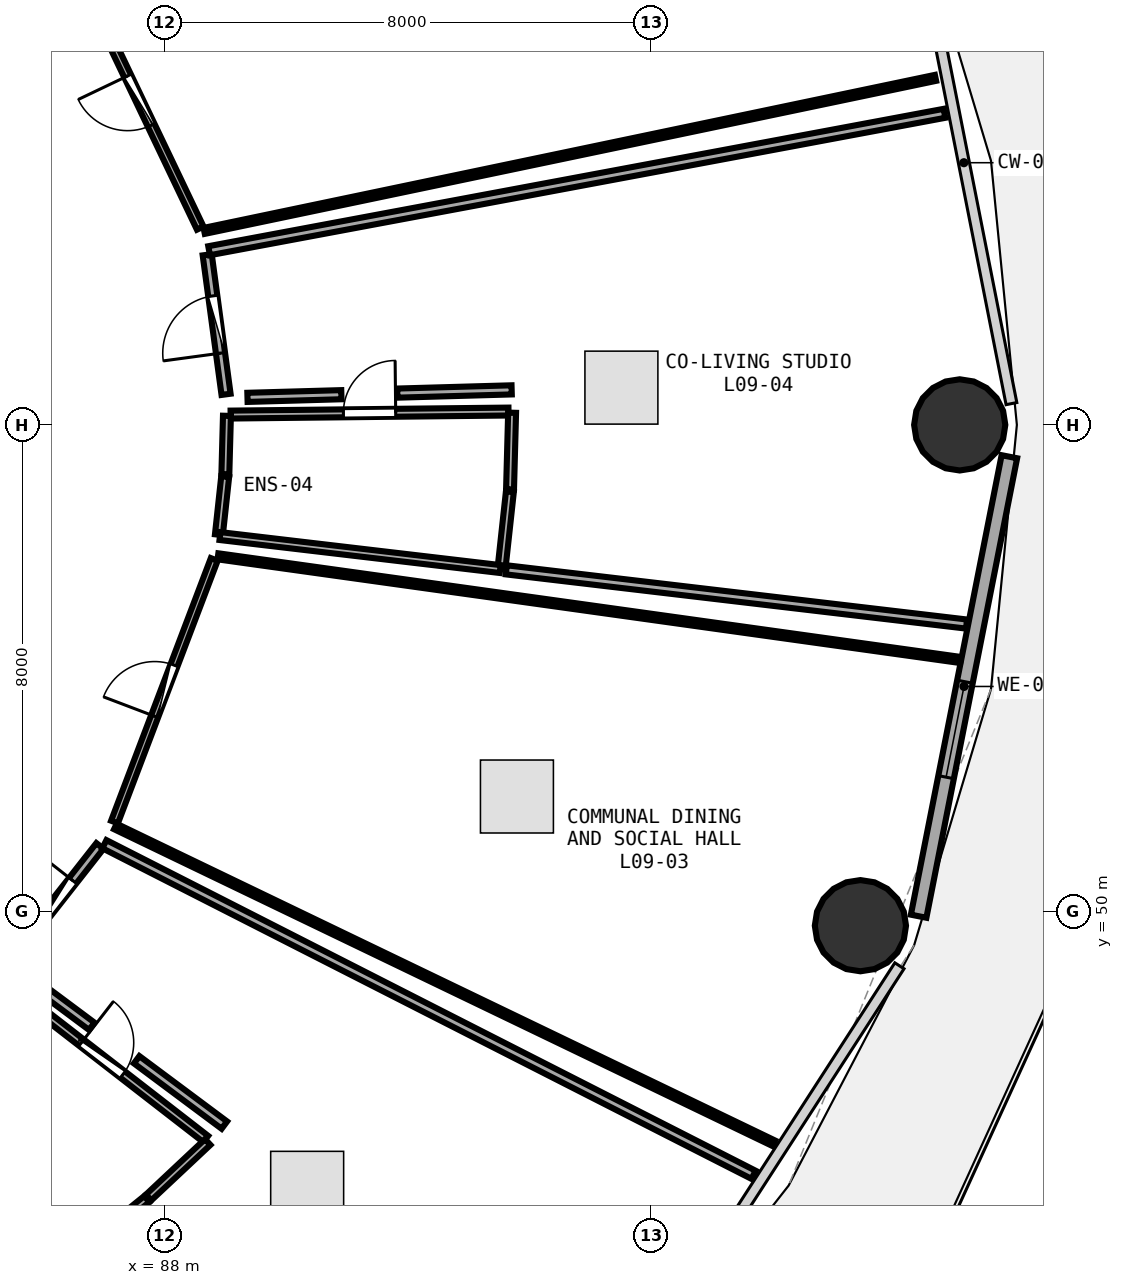
"""IFC4 building model, lengths in metres.
Left out: names, types, materials, properties, quantities, classifications, styles, units other than length and angle.
Written with IfcOpenShell. Run it as: python <this file> out.ifc"""

import sys

from ifc_helpers import new_model, si_unit, direction, frame, frame_2d, origin, origin_2d, place, context, subcontext, project, spatial, rectangle, circle, extrude, element, fill, save


model = new_model("IFC4")
c1 = context("Model", 3, precision=1e-05, world=origin(), true_north=direction((0.0, 1.0)))
c2 = subcontext(c1, "Body", "Model", "MODEL_VIEW")
j1 = project(units=[si_unit("LENGTHUNIT", "METRE"), si_unit("PLANEANGLEUNIT", "RADIAN")], contexts=[c1])
p1 = place(None, origin())
s1 = spatial("IfcSite", under=j1, at=p1, CompositionType="ELEMENT")
p2 = place(p1, origin())
s2 = spatial("IfcBuilding", under=s1, at=p2, CompositionType="ELEMENT")
p3 = place(p2, frame((0.0, 0.0, 37.5)))
s3 = spatial("IfcBuildingStorey", under=s2, at=p3, CompositionType="ELEMENT", Elevation=37.5)
for number, where, z_axis, x_axis in (
    (1, (101.08, 58.0, 0.0), (0.0, 0.0, 1.0), (1.0, 0.0, 0.0)),
    (2, (99.447, 49.764, 0.0), (0.0, 0.0, 1.0), (1.0, 0.0, 0.0)),
):
    element("IfcColumn", number, at=place(p3, frame(where, z_axis=z_axis, x_axis=x_axis)), inside=s3, PredefinedType="COLUMN", context=c2, shape_type="SweptSolid", body=[
        extrude(circle(Radius=0.75, at=origin_2d()), origin(), (0.0, 0.0, 1.0), 3.75),
    ])
p4 = place(p3, frame((100.404, 49.92, 0.0), z_axis=(0.0, 0.0, 1.0), x_axis=(0.193726159581, 0.98105564322, 0.0)))
e3 = element("IfcWall", 3, at=p4, inside=s3, PredefinedType="SOLIDWALL", context=c2, shape_type="SweptSolid", body=[
    extrude(rectangle(XDim=7.703, YDim=0.26, at=frame_2d((3.851, 0.0))), origin(), (0.0, 0.0, 1.0), 3.475),
])
p5 = place(p4, frame((2.331, 0.0, 0.85)))
e4 = element("IfcOpeningElement", 4, at=p5, cuts=e3, PredefinedType="OPENING", context=c2, shape_type="SweptSolid", body=[
    extrude(rectangle(XDim=1.6, YDim=1.45, at=frame_2d((0.8, 0.725))), frame((0.0, 0.14, 0.0), z_axis=(0.0, -1.0, 0.0), x_axis=(1.0, 0.0, 0.0)), (0.0, 0.0, 1.0), 0.28),
])
p6 = place(p3, frame((85.271, 48.898, 0.0), z_axis=(0.0, 0.0, 1.0), x_axis=(0.790415052175, -0.612571665436, 0.0)))
e5 = element("IfcWall", 5, at=p6, inside=s3, PredefinedType="PLUMBINGWALL", context=c2, shape_type="SweptSolid", body=[
    extrude(rectangle(XDim=4.312, YDim=0.13, at=frame_2d((2.156, 0.0))), origin(), (0.0, 0.0, 1.0), 2.875),
])
p7 = place(p6, frame((1.726, 0.0, 0.0)))
e6 = element("IfcOpeningElement", 6, at=p7, cuts=e5, PredefinedType="OPENING", context=c2, shape_type="SweptSolid", body=[
    extrude(rectangle(XDim=0.86, YDim=2.05, at=frame_2d((0.43, 1.025))), frame((0.0, 0.075, 0.0), z_axis=(0.0, -1.0, 0.0), x_axis=(1.0, 0.0, 0.0)), (0.0, 0.0, 1.0), 0.15),
])
p8 = place(p3, frame((85.459, 49.188, 0.0), z_axis=(0.0, 0.0, 1.0), x_axis=(0.617295583742, 0.786731315185, 0.0)))
e7 = element("IfcWall", 7, at=p8, inside=s3, PredefinedType="PARTITIONING", context=c2, shape_type="SweptSolid", body=[
    extrude(rectangle(XDim=2.399, YDim=0.15, at=frame_2d((1.2, 0.0))), origin(), (0.0, 0.0, 1.0), 2.875),
])
p9 = place(p8, frame((0.725, 0.0, 0.0)))
e8 = element("IfcOpeningElement", 8, at=p9, cuts=e7, PredefinedType="OPENING", context=c2, shape_type="SweptSolid", body=[
    extrude(rectangle(XDim=0.95, YDim=2.08, at=frame_2d((0.475, 1.04))), frame((0.0, 0.085, 0.0), z_axis=(0.0, -1.0, 0.0), x_axis=(1.0, 0.0, 0.0)), (0.0, 0.0, 1.0), 0.17),
])
p10 = place(p3, frame((87.179, 51.469, 0.0), z_axis=(0.0, 0.0, 1.0), x_axis=(0.355069987825, 0.934839720886, 0.0)))
e9 = element("IfcWall", 9, at=p10, inside=s3, PredefinedType="PARTITIONING", context=c2, shape_type="SweptSolid", body=[
    extrude(rectangle(XDim=4.62, YDim=0.12, at=frame_2d((2.31, 0.0))), origin(), (0.0, 0.0, 1.0), 3.48),
])
p11 = place(p10, frame((1.86, 0.0, 0.0)))
e10 = element("IfcOpeningElement", 10, at=p11, cuts=e9, PredefinedType="OPENING", context=c2, shape_type="SweptSolid", body=[
    extrude(rectangle(XDim=0.9, YDim=2.08, at=frame_2d((0.45, 1.04))), frame((0.0, 0.07, 0.0), z_axis=(0.0, -1.0, 0.0), x_axis=(1.0, 0.0, 0.0)), (0.0, 0.0, 1.0), 0.14),
])
p12 = place(p3, frame((89.089, 58.17, 0.0), z_axis=(0.0, 0.0, 1.0), x_axis=(0.999941196269, 0.01084453803, 0.0)))
e11 = element("IfcWall", 11, at=p12, inside=s3, PredefinedType="PLUMBINGWALL", context=c2, shape_type="SweptSolid", body=[
    extrude(rectangle(XDim=4.57, YDim=0.13, at=frame_2d((2.285, 0.0))), origin(), (0.0, 0.0, 1.0), 2.875),
])
p13 = place(p12, frame((1.855, 0.0, 0.0)))
e12 = element("IfcOpeningElement", 12, at=p13, cuts=e11, PredefinedType="OPENING", context=c2, shape_type="SweptSolid", body=[
    extrude(rectangle(XDim=0.86, YDim=2.05, at=frame_2d((0.43, 1.025))), frame((0.0, 0.075, 0.0), z_axis=(0.0, -1.0, 0.0), x_axis=(1.0, 0.0, 0.0)), (0.0, 0.0, 1.0), 0.15),
])
p14 = place(p3, frame((89.014, 58.502, 0.0), z_axis=(0.0, 0.0, 1.0), x_axis=(-0.133772399852, 0.991012081176, 0.0)))
e13 = element("IfcWall", 13, at=p14, inside=s3, PredefinedType="PARTITIONING", context=c2, shape_type="SweptSolid", body=[
    extrude(rectangle(XDim=2.316, YDim=0.15, at=frame_2d((1.158, 0.0))), origin(), (0.0, 0.0, 1.0), 3.48),
])
p15 = place(p14, frame((0.683, 0.0, 0.0)))
e14 = element("IfcOpeningElement", 14, at=p15, cuts=e13, PredefinedType="OPENING", context=c2, shape_type="SweptSolid", body=[
    extrude(rectangle(XDim=0.95, YDim=2.08, at=frame_2d((0.475, 1.04))), frame((0.0, 0.085, 0.0), z_axis=(0.0, -1.0, 0.0), x_axis=(1.0, 0.0, 0.0)), (0.0, 0.0, 1.0), 0.17),
])
p16 = place(p3, frame((88.589, 61.236, 0.0), z_axis=(0.0, 0.0, 1.0), x_axis=(-0.430743204219, 0.902474538155, 0.0)))
e15 = element("IfcWall", 15, at=p16, inside=s3, PredefinedType="PARTITIONING", context=c2, shape_type="SweptSolid", body=[
    extrude(rectangle(XDim=4.646, YDim=0.12, at=frame_2d((2.323, 0.0))), origin(), (0.0, 0.0, 1.0), 2.875),
])
p17 = place(p16, frame((1.873, 0.0, 0.0)))
e16 = element("IfcOpeningElement", 16, at=p17, cuts=e15, PredefinedType="OPENING", context=c2, shape_type="SweptSolid", body=[
    extrude(rectangle(XDim=0.9, YDim=2.08, at=frame_2d((0.45, 1.04))), frame((0.0, 0.07, 0.0), z_axis=(0.0, -1.0, 0.0), x_axis=(1.0, 0.0, 0.0)), (0.0, 0.0, 1.0), 0.14),
])
p18 = place(p3, frame((83.383, 47.303, 0.0), z_axis=(0.0, 0.0, 1.0), x_axis=(0.674190259417, -0.738557712103, 0.0)))
e17 = element("IfcWall", 17, at=p18, inside=s3, PredefinedType="PARTITIONING", context=c2, shape_type="SweptSolid", body=[
    extrude(rectangle(XDim=11.417, YDim=0.15, at=frame_2d((5.708, 0.0))), origin(), (0.0, 0.0, 1.0), 2.875),
])
p19 = place(p3, frame((88.712, 46.206, 0.0), z_axis=(0.0, 0.0, 1.0), x_axis=(-0.729371491019, -0.684117846638, 0.0)))
e18 = element("IfcWall", 18, at=p19, inside=s3, PredefinedType="PLUMBINGWALL", context=c2, shape_type="SweptSolid", body=[
    extrude(rectangle(XDim=1.333, YDim=0.13, at=frame_2d((0.666, 0.0))), origin(), (0.0, 0.0, 1.0), 3.48),
])
p20 = place(p3, frame((87.71, 45.268, 0.0), z_axis=(0.0, 0.0, 1.0), x_axis=(-0.777667827493, -0.628675393254, 0.0)))
e19 = element("IfcWall", 19, at=p20, inside=s3, PredefinedType="PLUMBINGWALL", context=c2, shape_type="SweptSolid", body=[
    extrude(rectangle(XDim=1.344, YDim=0.13, at=frame_2d((0.672, 0.0))), origin(), (0.0, 0.0, 1.0), 3.48),
])
p21 = place(p3, frame((86.636, 44.425, 0.0), z_axis=(0.0, 0.0, 1.0), x_axis=(-0.692667606139, 0.721256949641, 0.0)))
e20 = element("IfcWall", 20, at=p21, inside=s3, PredefinedType="PLUMBINGWALL", context=c2, shape_type="SweptSolid", body=[
    extrude(rectangle(XDim=4.304, YDim=0.13, at=frame_2d((2.152, 0.0))), origin(), (0.0, 0.0, 1.0), 3.235),
])
p22 = place(p3, frame((87.013, 51.105, 0.0), z_axis=(0.0, 0.0, 1.0), x_axis=(0.891110388763, -0.453786596363, 0.0)))
e21 = element("IfcWall", 21, at=p22, inside=s3, PredefinedType="PARTITIONING", context=c2, shape_type="SweptSolid", body=[
    extrude(rectangle(XDim=11.982, YDim=0.15, at=frame_2d((5.991, 0.0))), origin(), (0.0, 0.0, 1.0), 2.875),
])
p23 = place(p3, frame((88.986, 46.485, 0.0), z_axis=(0.0, 0.0, 1.0), x_axis=(-0.801771878898, 0.597630198542, 0.0)))
e22 = element("IfcWall", 22, at=p23, inside=s3, PredefinedType="PARTITIONING", context=c2, shape_type="SweptSolid", body=[
    extrude(rectangle(XDim=1.799, YDim=0.15, at=frame_2d((0.899, 0.0))), origin(), (0.0, 0.0, 1.0), 2.875),
])
p24 = place(p3, frame((86.806, 48.11, 0.0), z_axis=(0.0, 0.0, 1.0), x_axis=(-0.801786232624, 0.597610941311, 0.0)))
e23 = element("IfcWall", 23, at=p24, inside=s3, PredefinedType="PARTITIONING", context=c2, shape_type="SweptSolid", body=[
    extrude(rectangle(XDim=1.686, YDim=0.15, at=frame_2d((0.843, 0.0))), origin(), (0.0, 0.0, 1.0), 3.48),
])
p25 = place(p3, frame((88.881, 55.838, 0.0), z_axis=(0.0, 0.0, 1.0), x_axis=(0.990398529906, -0.138241643366, 0.0)))
e24 = element("IfcWall", 24, at=p25, inside=s3, PredefinedType="PARTITIONING", context=c2, shape_type="SweptSolid", body=[
    extrude(rectangle(XDim=12.332, YDim=0.1, at=frame_2d((6.166, 0.0))), origin(), (0.0, 0.0, 1.0), 2.875),
])
p26 = place(p3, frame((98.022, 46.186, 0.0), z_axis=(0.0, 0.0, 1.0), x_axis=(-0.901130168513, 0.43354863556, 0.0)))
e25 = element("IfcWall", 25, at=p26, inside=s3, PredefinedType="PARTITIONING", context=c2, shape_type="SweptSolid", body=[
    extrude(rectangle(XDim=12.016, YDim=0.1, at=frame_2d((6.008, 0.0))), origin(), (0.0, 0.0, 1.0), 2.875),
])
p27 = place(p3, frame((88.896, 56.194, 0.0), z_axis=(0.0, 0.0, 1.0), x_axis=(0.107726188353, 0.994180601472, 0.0)))
e26 = element("IfcWall", 26, at=p27, inside=s3, PredefinedType="PLUMBINGWALL", context=c2, shape_type="SweptSolid", body=[
    extrude(rectangle(XDim=0.961, YDim=0.13, at=frame_2d((0.48, 0.0))), origin(), (0.0, 0.0, 1.0), 3.48),
])
p28 = place(p3, frame((89.002, 57.189, 0.0), z_axis=(0.0, 0.0, 1.0), x_axis=(0.027202544209, 0.999629942323, 0.0)))
e27 = element("IfcWall", 27, at=p28, inside=s3, PredefinedType="PLUMBINGWALL", context=c2, shape_type="SweptSolid", body=[
    extrude(rectangle(XDim=0.96, YDim=0.13, at=frame_2d((0.48, 0.0))), origin(), (0.0, 0.0, 1.0), 2.875),
])
p29 = place(p3, frame((93.719, 58.2, 0.0), z_axis=(0.0, 0.0, 1.0), x_axis=(-0.026923002118, -0.999637510279, 0.0)))
e28 = element("IfcWall", 28, at=p29, inside=s3, PredefinedType="PLUMBINGWALL", context=c2, shape_type="SweptSolid", body=[
    extrude(rectangle(XDim=1.26, YDim=0.13, at=frame_2d((0.63, 0.0))), origin(), (0.0, 0.0, 1.0), 2.875),
])
p30 = place(p3, frame((93.682, 56.9, 0.0), z_axis=(0.0, 0.0, 1.0), x_axis=(-0.108454469845, -0.994101417347, 0.0)))
e29 = element("IfcWall", 29, at=p30, inside=s3, PredefinedType="PLUMBINGWALL", context=c2, shape_type="SweptSolid", body=[
    extrude(rectangle(XDim=1.26, YDim=0.13, at=frame_2d((0.63, 0.0))), origin(), (0.0, 0.0, 1.0), 3.48),
])
p31 = place(p3, frame((93.523, 55.629, 0.0), z_axis=(0.0, 0.0, 1.0), x_axis=(-0.993151681483, 0.116832091344, 0.0)))
e30 = element("IfcWall", 30, at=p31, inside=s3, PredefinedType="PLUMBINGWALL", context=c2, shape_type="SweptSolid", body=[
    extrude(rectangle(XDim=4.641, YDim=0.13, at=frame_2d((2.321, 0.0))), origin(), (0.0, 0.0, 1.0), 3.175),
])
p32 = place(p3, frame((88.735, 60.864, 0.0), z_axis=(0.0, 0.0, 1.0), x_axis=(0.982991936411, 0.183648721617, 0.0)))
e31 = element("IfcWall", 31, at=p32, inside=s3, PredefinedType="PARTITIONING", context=c2, shape_type="SweptSolid", body=[
    extrude(rectangle(XDim=12.303, YDim=0.15, at=frame_2d((6.152, 0.0))), origin(), (0.0, 0.0, 1.0), 2.875),
])
p33 = place(p3, frame((101.192, 54.725, 0.0), z_axis=(0.0, 0.0, 1.0), x_axis=(-0.993134415104, 0.116978773874, 0.0)))
e32 = element("IfcWall", 32, at=p33, inside=s3, PredefinedType="PARTITIONING", context=c2, shape_type="SweptSolid", body=[
    extrude(rectangle(XDim=7.622, YDim=0.15, at=frame_2d((3.811, 0.0))), origin(), (0.0, 0.0, 1.0), 2.875),
])
p34 = place(p3, frame((93.711, 58.576, 0.0), z_axis=(0.0, 0.0, 1.0), x_axis=(-0.999599776659, -0.028289335494, 0.0)))
e33 = element("IfcWall", 33, at=p34, inside=s3, PredefinedType="PARTITIONING", context=c2, shape_type="SweptSolid", body=[
    extrude(rectangle(XDim=1.881, YDim=0.15, at=frame_2d((0.941, 0.0))), origin(), (0.0, 0.0, 1.0), 3.175),
])
p35 = place(p3, frame((90.911, 58.497, 0.0), z_axis=(0.0, 0.0, 1.0), x_axis=(-0.999595430607, -0.02844248775, 0.0)))
e34 = element("IfcWall", 34, at=p35, inside=s3, PredefinedType="PARTITIONING", context=c2, shape_type="SweptSolid", body=[
    extrude(rectangle(XDim=1.545, YDim=0.15, at=frame_2d((0.772, 0.0))), origin(), (0.0, 0.0, 1.0), 3.235),
])
p36 = place(p3, frame((100.682, 63.707, 0.0), z_axis=(0.0, 0.0, 1.0), x_axis=(-0.978803686819, -0.204800738937, 0.0)))
e35 = element("IfcWall", 35, at=p36, inside=s3, PredefinedType="PARTITIONING", context=c2, shape_type="SweptSolid", body=[
    extrude(rectangle(XDim=12.288, YDim=0.1, at=frame_2d((6.144, 0.0))), origin(), (0.0, 0.0, 1.0), 2.875),
])
p37 = place(p5, origin())
e36 = element("IfcWindow", 36, at=p37, inside=s3, PartitioningType="SINGLE_PANEL", PredefinedType="WINDOW", context=c2, shape_type="SweptSolid", body=[
    extrude(rectangle(XDim=1.6, YDim=1.45, at=frame_2d((0.8, 0.725))), frame((0.0, 0.03, 0.0), z_axis=(0.0, -1.0, 0.0), x_axis=(1.0, 0.0, 0.0)), (0.0, 0.0, 1.0), 0.06),
])
fill(e4, e36)
p38 = place(p7, origin())
e37 = element("IfcDoor", 37, at=p38, inside=s3, OperationType="SINGLE_SWING_LEFT", PredefinedType="DOOR", context=c2, shape_type="SweptSolid", body=[
    extrude(rectangle(XDim=0.86, YDim=2.05, at=frame_2d((0.43, 1.025))), frame((0.0, 0.025, 0.0), z_axis=(0.0, -1.0, 0.0), x_axis=(1.0, 0.0, 0.0)), (0.0, 0.0, 1.0), 0.05),
])
fill(e6, e37)
p39 = place(p9, origin())
e38 = element("IfcDoor", 38, at=p39, inside=s3, OperationType="SINGLE_SWING_RIGHT", PredefinedType="DOOR", context=c2, shape_type="SweptSolid", body=[
    extrude(rectangle(XDim=0.95, YDim=2.08, at=frame_2d((0.475, 1.04))), frame((0.0, 0.025, 0.0), z_axis=(0.0, -1.0, 0.0), x_axis=(1.0, 0.0, 0.0)), (0.0, 0.0, 1.0), 0.05),
])
fill(e8, e38)
p40 = place(p11, origin())
e39 = element("IfcDoor", 39, at=p40, inside=s3, OperationType="SINGLE_SWING_LEFT", PredefinedType="DOOR", context=c2, shape_type="SweptSolid", body=[
    extrude(rectangle(XDim=0.9, YDim=2.08, at=frame_2d((0.45, 1.04))), frame((0.0, 0.025, 0.0), z_axis=(0.0, -1.0, 0.0), x_axis=(1.0, 0.0, 0.0)), (0.0, 0.0, 1.0), 0.05),
])
fill(e10, e39)
p41 = place(p13, origin())
e40 = element("IfcDoor", 40, at=p41, inside=s3, OperationType="SINGLE_SWING_RIGHT", PredefinedType="DOOR", context=c2, shape_type="SweptSolid", body=[
    extrude(rectangle(XDim=0.86, YDim=2.05, at=frame_2d((0.43, 1.025))), frame((0.0, 0.025, 0.0), z_axis=(0.0, -1.0, 0.0), x_axis=(1.0, 0.0, 0.0)), (0.0, 0.0, 1.0), 0.05),
])
fill(e12, e40)
p42 = place(p15, origin())
e41 = element("IfcDoor", 41, at=p42, inside=s3, OperationType="SINGLE_SWING_LEFT", PredefinedType="DOOR", context=c2, shape_type="SweptSolid", body=[
    extrude(rectangle(XDim=0.95, YDim=2.08, at=frame_2d((0.475, 1.04))), frame((0.0, 0.025, 0.0), z_axis=(0.0, -1.0, 0.0), x_axis=(1.0, 0.0, 0.0)), (0.0, 0.0, 1.0), 0.05),
])
fill(e14, e41)
p43 = place(p17, origin())
e42 = element("IfcDoor", 42, at=p43, inside=s3, OperationType="SINGLE_SWING_RIGHT", PredefinedType="DOOR", context=c2, shape_type="SweptSolid", body=[
    extrude(rectangle(XDim=0.9, YDim=2.08, at=frame_2d((0.45, 1.04))), frame((0.0, 0.025, 0.0), z_axis=(0.0, -1.0, 0.0), x_axis=(1.0, 0.0, 0.0)), (0.0, 0.0, 1.0), 0.05),
])
fill(e16, e42)
save(model, sys.argv[1])
